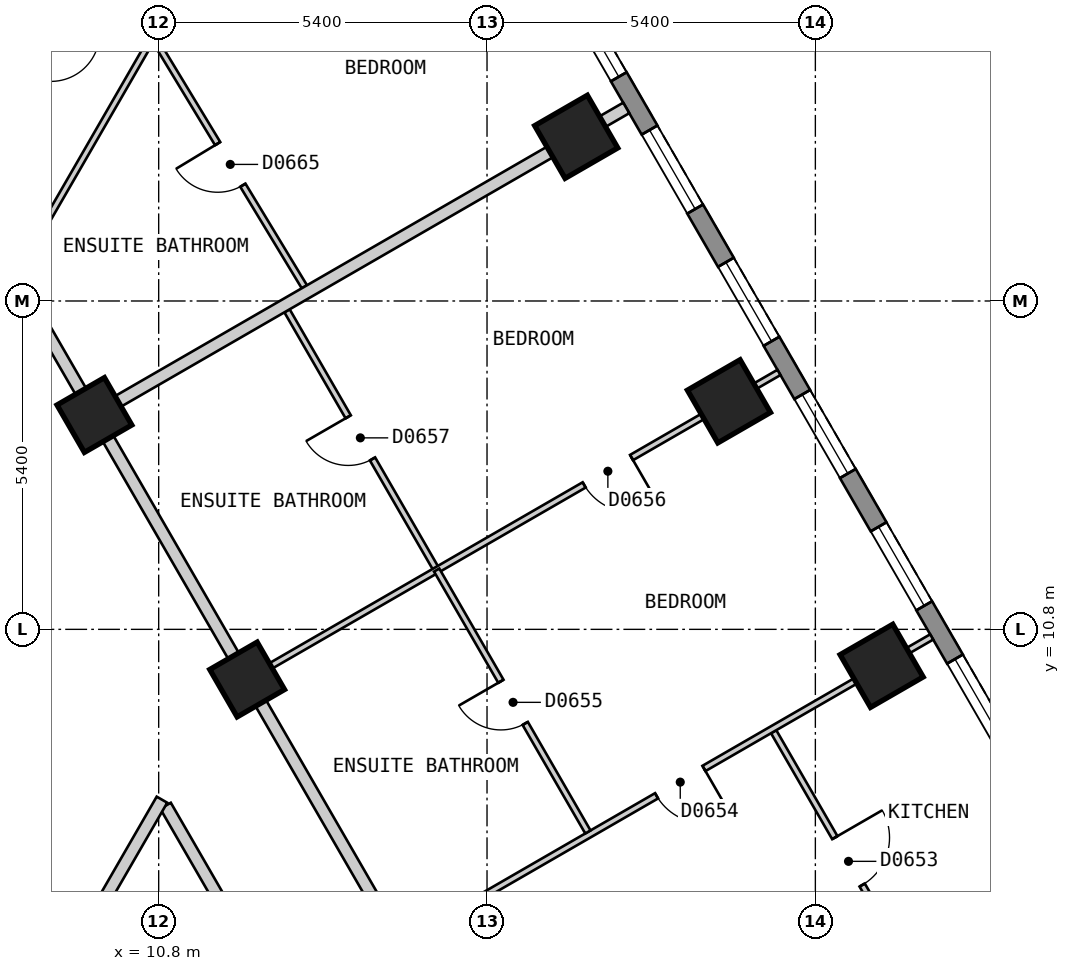
"""IFC4 building model, lengths in metres.
Left out: names, types, materials, properties, quantities, classifications, styles, units other than length and angle.
Written with IfcOpenShell. Run it as: python <this file> out.ifc"""

import sys

from ifc_helpers import new_model, si_unit, direction, frame, frame_2d, origin, origin_2d, place, context, subcontext, project, spatial, polyline, rectangle, outline, extrude, element, fill, save


model = new_model("IFC4")
c1 = context("Model", 3, precision=1e-05, world=origin(), true_north=direction((0.0, 1.0)))
c2 = subcontext(c1, "Body", "Model", "MODEL_VIEW")
j1 = project(units=[si_unit("LENGTHUNIT", "METRE"), si_unit("PLANEANGLEUNIT", "RADIAN")], contexts=[c1])
p1 = place(None, origin())
s1 = spatial("IfcSite", under=j1, at=p1, CompositionType="ELEMENT")
p2 = place(p1, origin())
s2 = spatial("IfcBuilding", under=s1, at=p2, CompositionType="ELEMENT")
p3 = place(p2, frame((0.0, 0.0, 75.0)))
s3 = spatial("IfcBuildingStorey", under=s2, at=p3, CompositionType="ELEMENT", Elevation=75.0)
for number, where, z_axis, x_axis in (
    (1, (22.69, 10.2, 0.0), (0.0, 0.0, 1.0), (-0.5, 0.866, 0.0)),
    (2, (20.179, 14.55, 0.0), (0.0, 0.0, 1.0), (-0.5, 0.866, 0.0)),
    (3, (17.667, 18.9, 0.0), (0.0, 0.0, 1.0), (-0.5, 0.866, 0.0)),
):
    element("IfcColumn", number, at=place(p3, frame(where, z_axis=z_axis, x_axis=x_axis)), inside=s3, PredefinedType="COLUMN", context=c2, shape_type="SweptSolid", body=[
        extrude(rectangle(XDim=1.0, YDim=1.0, at=origin_2d()), origin(), (0.0, 0.0, 1.0), 3.0),
    ])
for number, where, z_axis, x_axis in (
    (4, (12.255, 9.975, 0.0), (0.0, 0.0, 1.0), (-0.5, 0.866, 0.0)),
    (5, (9.743, 14.325, 0.0), (0.0, 0.0, 1.0), (-0.5, 0.866, 0.0)),
):
    element("IfcColumn", number, at=place(p3, frame(where, z_axis=z_axis, x_axis=x_axis)), inside=s3, PredefinedType="COLUMN", context=c2, shape_type="SweptSolid", body=[
        extrude(rectangle(XDim=0.9, YDim=0.9, at=origin_2d()), origin(), (0.0, 0.0, 1.0), 3.0),
    ])
p4 = place(p3, frame((29.027, 1.425, 0.0), z_axis=(0.0, 0.0, 1.0), x_axis=(-0.500027479704, 0.866009537788, 0.0)))
e6 = element("IfcWall", 6, at=p4, inside=s3, PredefinedType="SOLIDWALL", context=c2, shape_type="SweptSolid", body=[
    extrude(outline(polyline([(0.0, -0.15), (26.559, -0.15), (26.478, 0.15), (0.08, 0.15), (0.0, -0.15)])), origin(), (0.0, 0.0, 1.0), 2.7),
])
p5 = place(p4, frame((1.227, 0.0, 0.15)))
e7 = element("IfcOpeningElement", 7, at=p5, cuts=e6, PredefinedType="OPENING", context=c2, shape_type="SweptSolid", body=[
    extrude(rectangle(XDim=1.5, YDim=2.1, at=frame_2d((0.75, 1.05))), frame((0.0, 0.16, 0.0), z_axis=(0.0, -1.0, 0.0), x_axis=(1.0, 0.0, 0.0)), (0.0, 0.0, 1.0), 0.32),
])
p6 = place(p4, frame((3.738, 0.0, 0.15)))
e8 = element("IfcOpeningElement", 8, at=p6, cuts=e6, PredefinedType="OPENING", context=c2, shape_type="SweptSolid", body=[
    extrude(rectangle(XDim=1.5, YDim=2.1, at=frame_2d((0.75, 1.05))), frame((0.0, 0.16, 0.0), z_axis=(0.0, -1.0, 0.0), x_axis=(1.0, 0.0, 0.0)), (0.0, 0.0, 1.0), 0.32),
])
p7 = place(p4, frame((6.25, 0.0, 0.15)))
e9 = element("IfcOpeningElement", 9, at=p7, cuts=e6, PredefinedType="OPENING", context=c2, shape_type="SweptSolid", body=[
    extrude(rectangle(XDim=1.5, YDim=2.1, at=frame_2d((0.75, 1.05))), frame((0.0, 0.16, 0.0), z_axis=(0.0, -1.0, 0.0), x_axis=(1.0, 0.0, 0.0)), (0.0, 0.0, 1.0), 0.32),
])
p8 = place(p4, frame((8.761, 0.0, 0.15)))
e10 = element("IfcOpeningElement", 10, at=p8, cuts=e6, PredefinedType="OPENING", context=c2, shape_type="SweptSolid", body=[
    extrude(rectangle(XDim=1.5, YDim=2.1, at=frame_2d((0.75, 1.05))), frame((0.0, 0.16, 0.0), z_axis=(0.0, -1.0, 0.0), x_axis=(1.0, 0.0, 0.0)), (0.0, 0.0, 1.0), 0.32),
])
p9 = place(p4, frame((11.273, 0.0, 0.15)))
e11 = element("IfcOpeningElement", 11, at=p9, cuts=e6, PredefinedType="OPENING", context=c2, shape_type="SweptSolid", body=[
    extrude(rectangle(XDim=1.5, YDim=2.1, at=frame_2d((0.75, 1.05))), frame((0.0, 0.16, 0.0), z_axis=(0.0, -1.0, 0.0), x_axis=(1.0, 0.0, 0.0)), (0.0, 0.0, 1.0), 0.32),
])
p10 = place(p4, frame((13.785, 0.0, 0.15)))
e12 = element("IfcOpeningElement", 12, at=p10, cuts=e6, PredefinedType="OPENING", context=c2, shape_type="SweptSolid", body=[
    extrude(rectangle(XDim=1.5, YDim=2.1, at=frame_2d((0.75, 1.05))), frame((0.0, 0.16, 0.0), z_axis=(0.0, -1.0, 0.0), x_axis=(1.0, 0.0, 0.0)), (0.0, 0.0, 1.0), 0.32),
])
p11 = place(p4, frame((16.296, 0.0, 0.15)))
e13 = element("IfcOpeningElement", 13, at=p11, cuts=e6, PredefinedType="OPENING", context=c2, shape_type="SweptSolid", body=[
    extrude(rectangle(XDim=1.5, YDim=2.1, at=frame_2d((0.75, 1.05))), frame((0.0, 0.16, 0.0), z_axis=(0.0, -1.0, 0.0), x_axis=(1.0, 0.0, 0.0)), (0.0, 0.0, 1.0), 0.32),
])
p12 = place(p4, frame((18.807, 0.0, 0.15)))
e14 = element("IfcOpeningElement", 14, at=p12, cuts=e6, PredefinedType="OPENING", context=c2, shape_type="SweptSolid", body=[
    extrude(rectangle(XDim=1.5, YDim=2.1, at=frame_2d((0.75, 1.05))), frame((0.0, 0.16, 0.0), z_axis=(0.0, -1.0, 0.0), x_axis=(1.0, 0.0, 0.0)), (0.0, 0.0, 1.0), 0.32),
])
p13 = place(p4, frame((21.319, 0.0, 0.15)))
e15 = element("IfcOpeningElement", 15, at=p13, cuts=e6, PredefinedType="OPENING", context=c2, shape_type="SweptSolid", body=[
    extrude(rectangle(XDim=1.5, YDim=2.1, at=frame_2d((0.75, 1.05))), frame((0.0, 0.16, 0.0), z_axis=(0.0, -1.0, 0.0), x_axis=(1.0, 0.0, 0.0)), (0.0, 0.0, 1.0), 0.32),
])
p14 = place(p4, frame((23.831, 0.0, 0.15)))
e16 = element("IfcOpeningElement", 16, at=p14, cuts=e6, PredefinedType="OPENING", context=c2, shape_type="SweptSolid", body=[
    extrude(rectangle(XDim=1.5, YDim=2.1, at=frame_2d((0.75, 1.05))), frame((0.0, 0.16, 0.0), z_axis=(0.0, -1.0, 0.0), x_axis=(1.0, 0.0, 0.0)), (0.0, 0.0, 1.0), 0.32),
])
p15 = place(p3, frame((10.913, 7.899, 0.0), z_axis=(0.0, 0.0, 1.0), x_axis=(0.500028940566, -0.866008694296, 0.0)))
e17 = element("IfcWall", 17, at=p15, inside=s3, PredefinedType="PARTITIONING", context=c2, shape_type="SweptSolid", body=[
    extrude(rectangle(XDim=10.159, YDim=0.2, at=frame_2d((5.08, 0.0))), origin(), (0.0, 0.0, 1.0), 2.7),
])
p16 = place(p15, frame((4.63, 0.0, 0.0)))
e18 = element("IfcOpeningElement", 18, at=p16, cuts=e17, PredefinedType="OPENING", context=c2, shape_type="SweptSolid", body=[
    extrude(rectangle(XDim=0.9, YDim=2.1, at=frame_2d((0.45, 1.05))), frame((0.0, 0.11, 0.0), z_axis=(0.0, -1.0, 0.0), x_axis=(1.0, 0.0, 0.0)), (0.0, 0.0, 1.0), 0.22),
])
p17 = place(p3, frame((8.488, 16.5, 0.0), z_axis=(0.0, 0.0, 1.0), x_axis=(0.499986836607, -0.86603300354, 0.0)))
e19 = element("IfcWall", 19, at=p17, inside=s3, PredefinedType="PARTITIONING", context=c2, shape_type="SweptSolid", body=[
    extrude(rectangle(XDim=20.09, YDim=0.2, at=frame_2d((10.045, 0.0))), origin(), (0.0, 0.0, 1.0), 2.7),
])
p18 = place(p17, frame((14.569, 0.0, 0.0)))
e20 = element("IfcOpeningElement", 20, at=p18, cuts=e19, PredefinedType="OPENING", context=c2, shape_type="SweptSolid", body=[
    extrude(rectangle(XDim=1.0, YDim=2.1, at=frame_2d((0.5, 1.05))), frame((0.0, 0.11, 0.0), z_axis=(0.0, -1.0, 0.0), x_axis=(1.0, 0.0, 0.0)), (0.0, 0.0, 1.0), 0.22),
])
p19 = place(p3, frame((6.928, 1.2, 0.0), z_axis=(0.0, 0.0, 1.0), x_axis=(0.500055327065, 0.865993458332, 0.0)))
e21 = element("IfcWall", 21, at=p19, inside=s3, PredefinedType="PARTITIONING", context=c2, shape_type="SweptSolid", body=[
    extrude(rectangle(XDim=7.851, YDim=0.2, at=frame_2d((3.926, 0.0))), origin(), (0.0, 0.0, 1.0), 2.7),
])
p20 = place(p3, frame((10.738, 20.492, 0.0), z_axis=(0.0, 0.0, 1.0), x_axis=(0.518100976056, -0.855319459974, 0.0)))
e22 = element("IfcWall", 22, at=p20, inside=s3, PredefinedType="PARTITIONING", context=c2, shape_type="SweptSolid", body=[
    extrude(rectangle(XDim=4.744, YDim=0.1, at=frame_2d((2.372, 0.0))), origin(), (0.0, 0.0, 1.0), 2.7),
])
p21 = place(p20, frame((1.992, 0.0, 0.0)))
e23 = element("IfcOpeningElement", 23, at=p21, cuts=e22, PredefinedType="OPENING", context=c2, shape_type="SweptSolid", body=[
    extrude(rectangle(XDim=0.8, YDim=2.1, at=frame_2d((0.4, 1.05))), frame((0.0, 0.06, 0.0), z_axis=(0.0, -1.0, 0.0), x_axis=(1.0, 0.0, 0.0)), (0.0, 0.0, 1.0), 0.12),
])
p22 = place(p3, frame((12.911, 16.038, 0.0), z_axis=(0.0, 0.0, 1.0), x_axis=(0.499974319101, -0.866040230151, 0.0)))
e24 = element("IfcWall", 24, at=p22, inside=s3, PredefinedType="PARTITIONING", context=c2, shape_type="SweptSolid", body=[
    extrude(rectangle(XDim=4.923, YDim=0.1, at=frame_2d((2.461, 0.0))), origin(), (0.0, 0.0, 1.0), 2.7),
])
p23 = place(p22, frame((2.012, 0.0, 0.0)))
e25 = element("IfcOpeningElement", 25, at=p23, cuts=e24, PredefinedType="OPENING", context=c2, shape_type="SweptSolid", body=[
    extrude(rectangle(XDim=0.8, YDim=2.1, at=frame_2d((0.4, 1.05))), frame((0.0, 0.06, 0.0), z_axis=(0.0, -1.0, 0.0), x_axis=(1.0, 0.0, 0.0)), (0.0, 0.0, 1.0), 0.12),
])
p24 = place(p3, frame((20.914, 9.117, 0.0), z_axis=(0.0, 0.0, 1.0), x_axis=(0.500007182864, -0.866021256716, 0.0)))
e26 = element("IfcWall", 26, at=p24, inside=s3, PredefinedType="PARTITIONING", context=c2, shape_type="SweptSolid", body=[
    extrude(rectangle(XDim=4.874, YDim=0.1, at=frame_2d((2.437, 0.0))), origin(), (0.0, 0.0, 1.0), 2.7),
])
p25 = place(p24, frame((2.012, 0.0, 0.0)))
e27 = element("IfcOpeningElement", 27, at=p25, cuts=e26, PredefinedType="OPENING", context=c2, shape_type="SweptSolid", body=[
    extrude(rectangle(XDim=0.9, YDim=2.1, at=frame_2d((0.45, 1.05))), frame((0.0, 0.06, 0.0), z_axis=(0.0, -1.0, 0.0), x_axis=(1.0, 0.0, 0.0)), (0.0, 0.0, 1.0), 0.12),
])
p26 = place(p3, frame((8.43, 16.6, 0.0), z_axis=(0.0, 0.0, 1.0), x_axis=(0.499951460778, 0.866053426104, 0.0)))
e28 = element("IfcWall", 28, at=p26, inside=s3, PredefinedType="PARTITIONING", context=c2, shape_type="SweptSolid", body=[
    extrude(rectangle(XDim=4.553, YDim=0.1, at=frame_2d((2.276, 0.0))), origin(), (0.0, 0.0, 1.0), 2.7),
])
p27 = place(p3, frame((14.853, 5.675, 0.0), z_axis=(0.0, 0.0, 1.0), x_axis=(0.866016855193, 0.500014806302, 0.0)))
e29 = element("IfcWall", 29, at=p27, inside=s3, PredefinedType="PARTITIONING", context=c2, shape_type="SweptSolid", body=[
    extrude(rectangle(XDim=10.0, YDim=0.1, at=frame_2d((5.0, 0.0))), origin(), (0.0, 0.0, 1.0), 2.7),
])
p28 = place(p27, frame((4.775, 0.0, 0.0)))
e30 = element("IfcOpeningElement", 30, at=p28, cuts=e29, PredefinedType="OPENING", context=c2, shape_type="SweptSolid", body=[
    extrude(rectangle(XDim=0.9, YDim=2.1, at=frame_2d((0.45, 1.05))), frame((0.0, 0.06, 0.0), z_axis=(0.0, -1.0, 0.0), x_axis=(1.0, 0.0, 0.0)), (0.0, 0.0, 1.0), 0.12),
])
p29 = place(p3, frame((12.342, 10.025, 0.0), z_axis=(0.0, 0.0, 1.0), x_axis=(0.865992435864, 0.500057097767, 0.0)))
e31 = element("IfcWall", 31, at=p29, inside=s3, PredefinedType="PARTITIONING", context=c2, shape_type="SweptSolid", body=[
    extrude(rectangle(XDim=9.999, YDim=0.1, at=frame_2d((5.0, 0.0))), origin(), (0.0, 0.0, 1.0), 2.7),
])
p30 = place(p29, frame((6.3, 0.0, 0.0)))
e32 = element("IfcOpeningElement", 32, at=p30, cuts=e31, PredefinedType="OPENING", context=c2, shape_type="SweptSolid", body=[
    extrude(rectangle(XDim=0.9, YDim=2.1, at=frame_2d((0.45, 1.05))), frame((0.0, 0.06, 0.0), z_axis=(0.0, -1.0, 0.0), x_axis=(1.0, 0.0, 0.0)), (0.0, 0.0, 1.0), 0.12),
])
p31 = place(p3, frame((9.83, 14.375, 0.0), z_axis=(0.0, 0.0, 1.0), x_axis=(0.866016855193, 0.500014806302, 0.0)))
e33 = element("IfcWall", 33, at=p31, inside=s3, PredefinedType="PARTITIONING", context=c2, shape_type="SweptSolid", body=[
    extrude(rectangle(XDim=10.0, YDim=0.2, at=frame_2d((5.0, 0.0))), origin(), (0.0, 0.0, 1.0), 2.7),
])
p32 = place(p3, frame((15.372, 11.775, 0.0), z_axis=(0.0, 0.0, 1.0), x_axis=(0.500035488351, -0.866004913606, 0.0)))
e34 = element("IfcWall", 34, at=p32, inside=s3, PredefinedType="PARTITIONING", context=c2, shape_type="SweptSolid", body=[
    extrude(rectangle(XDim=4.973, YDim=0.1, at=frame_2d((2.487, 0.0))), origin(), (0.0, 0.0, 1.0), 2.7),
])
p33 = place(p32, frame((2.112, 0.0, 0.0)))
e35 = element("IfcOpeningElement", 35, at=p33, cuts=e34, PredefinedType="OPENING", context=c2, shape_type="SweptSolid", body=[
    extrude(rectangle(XDim=0.8, YDim=2.1, at=frame_2d((0.4, 1.05))), frame((0.0, 0.06, 0.0), z_axis=(0.0, -1.0, 0.0), x_axis=(1.0, 0.0, 0.0)), (0.0, 0.0, 1.0), 0.12),
])
p34 = place(p8, origin())
e36 = element("IfcWindow", 36, at=p34, inside=s3, PartitioningType="SINGLE_PANEL", PredefinedType="WINDOW", context=c2, shape_type="SweptSolid", body=[
    extrude(rectangle(XDim=1.5, YDim=2.1, at=frame_2d((0.75, 1.05))), frame((0.0, 0.03, 0.0), z_axis=(0.0, -1.0, 0.0), x_axis=(1.0, 0.0, 0.0)), (0.0, 0.0, 1.0), 0.06),
])
fill(e10, e36)
p35 = place(p9, origin())
e37 = element("IfcWindow", 37, at=p35, inside=s3, PartitioningType="SINGLE_PANEL", PredefinedType="WINDOW", context=c2, shape_type="SweptSolid", body=[
    extrude(rectangle(XDim=1.5, YDim=2.1, at=frame_2d((0.75, 1.05))), frame((0.0, 0.03, 0.0), z_axis=(0.0, -1.0, 0.0), x_axis=(1.0, 0.0, 0.0)), (0.0, 0.0, 1.0), 0.06),
])
fill(e11, e37)
p36 = place(p10, origin())
e38 = element("IfcWindow", 38, at=p36, inside=s3, PartitioningType="SINGLE_PANEL", PredefinedType="WINDOW", context=c2, shape_type="SweptSolid", body=[
    extrude(rectangle(XDim=1.5, YDim=2.1, at=frame_2d((0.75, 1.05))), frame((0.0, 0.03, 0.0), z_axis=(0.0, -1.0, 0.0), x_axis=(1.0, 0.0, 0.0)), (0.0, 0.0, 1.0), 0.06),
])
fill(e12, e38)
p37 = place(p11, origin())
e39 = element("IfcWindow", 39, at=p37, inside=s3, PartitioningType="SINGLE_PANEL", PredefinedType="WINDOW", context=c2, shape_type="SweptSolid", body=[
    extrude(rectangle(XDim=1.5, YDim=2.1, at=frame_2d((0.75, 1.05))), frame((0.0, 0.03, 0.0), z_axis=(0.0, -1.0, 0.0), x_axis=(1.0, 0.0, 0.0)), (0.0, 0.0, 1.0), 0.06),
])
fill(e13, e39)
p38 = place(p12, origin())
e40 = element("IfcWindow", 40, at=p38, inside=s3, PartitioningType="SINGLE_PANEL", PredefinedType="WINDOW", context=c2, shape_type="SweptSolid", body=[
    extrude(rectangle(XDim=1.5, YDim=2.1, at=frame_2d((0.75, 1.05))), frame((0.0, 0.03, 0.0), z_axis=(0.0, -1.0, 0.0), x_axis=(1.0, 0.0, 0.0)), (0.0, 0.0, 1.0), 0.06),
])
fill(e14, e40)
p39 = place(p13, origin())
e41 = element("IfcWindow", 41, at=p39, inside=s3, PartitioningType="SINGLE_PANEL", PredefinedType="WINDOW", context=c2, shape_type="SweptSolid", body=[
    extrude(rectangle(XDim=1.5, YDim=2.1, at=frame_2d((0.75, 1.05))), frame((0.0, 0.03, 0.0), z_axis=(0.0, -1.0, 0.0), x_axis=(1.0, 0.0, 0.0)), (0.0, 0.0, 1.0), 0.06),
])
fill(e15, e41)
p40 = place(p25, origin())
e42 = element("IfcDoor", 42, at=p40, inside=s3, OperationType="SINGLE_SWING_LEFT", PredefinedType="DOOR", context=c2, shape_type="SweptSolid", body=[
    extrude(rectangle(XDim=0.9, YDim=2.1, at=frame_2d((0.45, 1.05))), frame((0.0, 0.025, 0.0), z_axis=(0.0, -1.0, 0.0), x_axis=(1.0, 0.0, 0.0)), (0.0, 0.0, 1.0), 0.05),
])
fill(e27, e42)
p41 = place(p28, origin())
e43 = element("IfcDoor", 43, at=p41, inside=s3, OperationType="SINGLE_SWING_RIGHT", PredefinedType="DOOR", context=c2, shape_type="SweptSolid", body=[
    extrude(rectangle(XDim=0.9, YDim=2.1, at=frame_2d((0.45, 1.05))), frame((0.0, 0.025, 0.0), z_axis=(0.0, -1.0, 0.0), x_axis=(1.0, 0.0, 0.0)), (0.0, 0.0, 1.0), 0.05),
])
fill(e30, e43)
p42 = place(p33, origin())
e44 = element("IfcDoor", 44, at=p42, inside=s3, OperationType="SINGLE_SWING_LEFT", PredefinedType="DOOR", context=c2, shape_type="SweptSolid", body=[
    extrude(rectangle(XDim=0.8, YDim=2.1, at=frame_2d((0.4, 1.05))), frame((0.0, 0.025, 0.0), z_axis=(0.0, -1.0, 0.0), x_axis=(1.0, 0.0, 0.0)), (0.0, 0.0, 1.0), 0.05),
])
fill(e35, e44)
p43 = place(p30, origin())
e45 = element("IfcDoor", 45, at=p43, inside=s3, OperationType="SINGLE_SWING_RIGHT", PredefinedType="DOOR", context=c2, shape_type="SweptSolid", body=[
    extrude(rectangle(XDim=0.9, YDim=2.1, at=frame_2d((0.45, 1.05))), frame((0.0, 0.025, 0.0), z_axis=(0.0, -1.0, 0.0), x_axis=(1.0, 0.0, 0.0)), (0.0, 0.0, 1.0), 0.05),
])
fill(e32, e45)
p44 = place(p23, origin())
e46 = element("IfcDoor", 46, at=p44, inside=s3, OperationType="SINGLE_SWING_LEFT", PredefinedType="DOOR", context=c2, shape_type="SweptSolid", body=[
    extrude(rectangle(XDim=0.8, YDim=2.1, at=frame_2d((0.4, 1.05))), frame((0.0, 0.025, 0.0), z_axis=(0.0, -1.0, 0.0), x_axis=(1.0, 0.0, 0.0)), (0.0, 0.0, 1.0), 0.05),
])
fill(e25, e46)
p45 = place(p21, origin())
e47 = element("IfcDoor", 47, at=p45, inside=s3, OperationType="SINGLE_SWING_LEFT", PredefinedType="DOOR", context=c2, shape_type="SweptSolid", body=[
    extrude(rectangle(XDim=0.8, YDim=2.1, at=frame_2d((0.4, 1.05))), frame((0.0, 0.025, 0.0), z_axis=(0.0, -1.0, 0.0), x_axis=(1.0, 0.0, 0.0)), (0.0, 0.0, 1.0), 0.05),
])
fill(e23, e47)
save(model, sys.argv[1])
